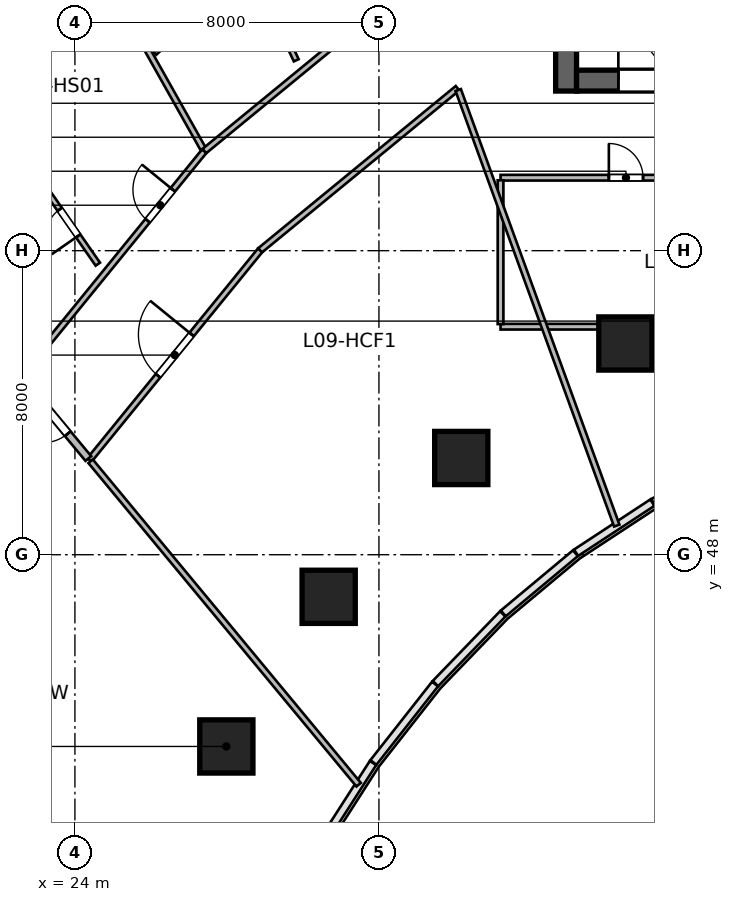
"""IFC4 building model, lengths in metres.
Left out: names, types, materials, properties, quantities, classifications, styles, units other than length and angle.
Written with IfcOpenShell. Run it as: python <this file> out.ifc"""

import sys

from ifc_helpers import new_model, si_unit, direction, frame, frame_2d, origin, origin_2d, place, context, subcontext, project, spatial, rectangle, circle, extrude, source, transform, mapped, element, fill, save


model = new_model("IFC4")
c1 = context("Model", 3, precision=1e-05, world=origin(), true_north=direction((0.0, 1.0)))
c2 = subcontext(c1, "Body", "Model", "MODEL_VIEW")
j1 = project(units=[si_unit("LENGTHUNIT", "METRE"), si_unit("PLANEANGLEUNIT", "RADIAN")], contexts=[c1])
p1 = place(None, origin())
s1 = spatial("IfcSite", under=j1, at=p1, CompositionType="ELEMENT")
p2 = place(p1, origin())
s2 = spatial("IfcBuilding", under=s1, at=p2, CompositionType="ELEMENT")
p3 = place(p2, frame((0.0, 0.0, 46.2)))
s3 = spatial("IfcBuildingStorey", under=s2, at=p3, CompositionType="ELEMENT", Elevation=46.2)
m1 = source(origin(), c2, "Body", "SweptSolid", [
    extrude(rectangle(XDim=12.0, YDim=0.55, at=frame_2d((6.0, 0.0))), origin(), (0.0, 0.0, 1.0), 3.6),
])
p4 = place(p3, frame((36.925, 60.2, 0.0), z_axis=(0.0, 0.0, 1.0), x_axis=(0.0, 1.0, 0.0)))
e1 = element("IfcWall", 1, at=p4, inside=s3, PredefinedType="SHEAR", context=c2, shape_type="MappedRepresentation", body=[
    mapped(m1, transform((0.0, 0.0, 0.0), scale=1.0)),
])
m2 = source(origin(), c2, "Body", "SweptSolid", [
    extrude(rectangle(XDim=21.6, YDim=0.55, at=frame_2d((10.8, 0.0))), origin(), (0.0, 0.0, 1.0), 3.6),
])
p5 = place(p3, frame((37.2, 60.475, 0.0), z_axis=(0.0, 0.0, 1.0), x_axis=(1.0, 0.0, 0.0)))
e2 = element("IfcWall", 2, at=p5, inside=s3, PredefinedType="SHEAR", context=c2, shape_type="MappedRepresentation", body=[
    mapped(m2, transform((0.0, 0.0, 0.0), scale=1.0)),
])
p6 = place(p5, frame((1.1, 0.0, 0.0)))
e3 = element("IfcOpeningElement", 3, at=p6, cuts=e2, PredefinedType="OPENING", context=c2, shape_type="SweptSolid", body=[
    extrude(rectangle(XDim=1.15, YDim=2.15, at=frame_2d((0.575, 1.075))), frame((0.0, 0.285, 0.0), z_axis=(0.0, -1.0, 0.0), x_axis=(1.0, 0.0, 0.0)), (0.0, 0.0, 1.0), 0.57),
])
p7 = place(p5, frame((19.5, 0.0, 0.0)))
e4 = element("IfcOpeningElement", 4, at=p7, cuts=e2, PredefinedType="OPENING", context=c2, shape_type="SweptSolid", body=[
    extrude(rectangle(XDim=0.9, YDim=2.1, at=frame_2d((0.45, 1.05))), frame((0.0, 0.285, 0.0), z_axis=(0.0, -1.0, 0.0), x_axis=(1.0, 0.0, 0.0)), (0.0, 0.0, 1.0), 0.57),
])
p8 = place(p5, frame((12.02, 0.0, 0.0)))
e5 = element("IfcOpeningElement", 5, at=p8, cuts=e2, PredefinedType="OPENING", context=c2, shape_type="SweptSolid", body=[
    extrude(rectangle(XDim=1.6, YDim=2.15, at=frame_2d((0.8, 1.075))), frame((0.0, 0.285, 0.0), z_axis=(0.0, -1.0, 0.0), x_axis=(1.0, 0.0, 0.0)), (0.0, 0.0, 1.0), 0.57),
])
m3 = source(origin(), c2, "Body", "SweptSolid", [
    extrude(circle(Radius=0.7, at=origin_2d()), origin(), (0.0, 0.0, 1.0), 3.6),
])
for number, where, z_axis, x_axis in (
    (6, (27.985, 42.955, 0.0), (0.0, 0.0, 1.0), (-0.691, 0.723, 0.0)),
    (7, (30.677, 46.892, 0.0), (0.0, 0.0, 1.0), (-0.571, 0.821, 0.0)),
    (8, (34.166, 50.545, 0.0), (0.0, 0.0, 1.0), (-0.436, 0.9, 0.0)),
    (9, (38.485, 53.558, 0.0), (0.0, 0.0, 1.0), (-0.289, 0.957, 0.0)),
):
    element("IfcColumn", number, at=place(p3, frame(where, z_axis=z_axis, x_axis=x_axis)), inside=s3, PredefinedType="COLUMN", context=c2, shape_type="MappedRepresentation", body=[
        mapped(m3, transform((0.0, 0.0, 0.0), scale=1.0)),
    ])
m4 = source(origin(), c2, "Body", "SweptSolid", [
    extrude(rectangle(XDim=6.6, YDim=0.15, at=frame_2d((3.3, 0.0))), origin(), (0.0, 0.0, 1.0), 2.803),
])
p9 = place(p3, frame((35.2, 54.0, 0.0), z_axis=(0.0, 0.0, 1.0), x_axis=(1.0, 0.0, 0.0)))
e10 = element("IfcWall", 10, at=p9, inside=s3, PredefinedType="PARTITIONING", context=c2, shape_type="MappedRepresentation", body=[
    mapped(m4, transform((0.0, 0.0, 0.0), scale=1.0)),
])
m5 = source(origin(), c2, "Body", "SweptSolid", [
    extrude(rectangle(XDim=6.6, YDim=0.15, at=frame_2d((3.3, 0.0))), origin(), (0.0, 0.0, 1.0), 3.36),
])
p10 = place(p3, frame((35.2, 57.92, 0.0), z_axis=(0.0, 0.0, 1.0), x_axis=(1.0, 0.0, 0.0)))
e11 = element("IfcWall", 11, at=p10, inside=s3, PredefinedType="PARTITIONING", context=c2, shape_type="MappedRepresentation", body=[
    mapped(m5, transform((0.0, 0.0, 0.0), scale=1.0)),
])
p11 = place(p10, frame((2.85, 0.0, 0.0)))
e12 = element("IfcOpeningElement", 12, at=p11, cuts=e11, PredefinedType="OPENING", context=c2, shape_type="SweptSolid", body=[
    extrude(rectangle(XDim=0.9, YDim=2.1, at=frame_2d((0.45, 1.05))), frame((0.0, 0.085, 0.0), z_axis=(0.0, -1.0, 0.0), x_axis=(1.0, 0.0, 0.0)), (0.0, 0.0, 1.0), 0.17),
])
m6 = source(origin(), c2, "Body", "SweptSolid", [
    extrude(rectangle(XDim=3.785, YDim=0.15, at=frame_2d((1.893, 0.0))), origin(), (0.0, 0.0, 1.0), 3.36),
])
p12 = place(p3, frame((35.2, 54.067, 0.0), z_axis=(0.0, 0.0, 1.0), x_axis=(0.0, 1.0, 0.0)))
e13 = element("IfcWall", 13, at=p12, inside=s3, PredefinedType="PARTITIONING", context=c2, shape_type="MappedRepresentation", body=[
    mapped(m6, transform((0.0, 0.0, 0.0), scale=1.0)),
])
m7 = source(origin(), c2, "Body", "SweptSolid", [
    extrude(rectangle(XDim=7.659, YDim=0.15, at=frame_2d((3.829, 0.0))), origin(), (0.0, 0.0, 1.0), 3.36),
])
p13 = place(p3, frame((22.57, 52.683, 0.0), z_axis=(0.0, 0.0, 1.0), x_axis=(0.631489868862, 0.775384127723, 0.0)))
e14 = element("IfcWall", 14, at=p13, inside=s3, PredefinedType="PARTITIONING", context=c2, shape_type="MappedRepresentation", body=[
    mapped(m7, transform((0.0, 0.0, 0.0), scale=1.0)),
])
p14 = place(p13, frame((5.295, 0.0, 0.0)))
e15 = element("IfcOpeningElement", 15, at=p14, cuts=e14, PredefinedType="OPENING", context=c2, shape_type="SweptSolid", body=[
    extrude(rectangle(XDim=1.05, YDim=2.15, at=frame_2d((0.525, 1.075))), frame((0.0, 0.085, 0.0), z_axis=(0.0, -1.0, 0.0), x_axis=(1.0, 0.0, 0.0)), (0.0, 0.0, 1.0), 0.17),
])
m8 = source(origin(), c2, "Body", "SweptSolid", [
    extrude(rectangle(XDim=11.573, YDim=0.15, at=frame_2d((5.786, 0.0))), origin(), (0.0, 0.0, 1.0), 3.36),
])
p15 = place(p3, frame((27.382, 58.664, 0.0), z_axis=(0.0, 0.0, 1.0), x_axis=(-0.490161073951, 0.871631872744, 0.0)))
e16 = element("IfcWall", 16, at=p15, inside=s3, PredefinedType="PARTITIONING", context=c2, shape_type="MappedRepresentation", body=[
    mapped(m8, transform((0.0, 0.0, 0.0), scale=1.0)),
])
m9 = source(origin(), c2, "Body", "SweptSolid", [
    extrude(rectangle(XDim=2.663, YDim=0.14, at=frame_2d((1.332, 0.0))), origin(), (0.0, 0.0, 1.0), 2.644),
])
p16 = place(p3, frame((24.603, 55.645, 0.0), z_axis=(0.0, 0.0, 1.0), x_axis=(-0.570905989724, 0.821015438891, 0.0)))
e17 = element("IfcWall", 17, at=p16, inside=s3, PredefinedType="PARTITIONING", context=c2, shape_type="MappedRepresentation", body=[
    mapped(m9, transform((0.0, 0.0, 0.0), scale=1.0)),
])
p17 = place(p16, frame((0.906, 0.0, 0.0)))
e18 = element("IfcOpeningElement", 18, at=p17, cuts=e17, PredefinedType="OPENING", context=c2, shape_type="SweptSolid", body=[
    extrude(rectangle(XDim=0.85, YDim=2.05, at=frame_2d((0.425, 1.025))), frame((0.0, 0.08, 0.0), z_axis=(0.0, -1.0, 0.0), x_axis=(1.0, 0.0, 0.0)), (0.0, 0.0, 1.0), 0.16),
])
m10 = source(origin(), c2, "Body", "SweptSolid", [
    extrude(rectangle(XDim=7.237, YDim=0.15, at=frame_2d((3.618, 0.0))), origin(), (0.0, 0.0, 1.0), 3.36),
])
p18 = place(p3, frame((27.406, 58.621, 0.0), z_axis=(0.0, 0.0, 1.0), x_axis=(0.772813707793, 0.634632943557, 0.0)))
e19 = element("IfcWall", 19, at=p18, inside=s3, PredefinedType="PARTITIONING", context=c2, shape_type="MappedRepresentation", body=[
    mapped(m10, transform((0.0, 0.0, 0.0), scale=1.0)),
])
p19 = place(p18, frame((4.975, 0.0, 0.0)))
e20 = element("IfcOpeningElement", 20, at=p19, cuts=e19, PredefinedType="OPENING", context=c2, shape_type="SweptSolid", body=[
    extrude(rectangle(XDim=1.05, YDim=2.15, at=frame_2d((0.525, 1.075))), frame((0.0, 0.085, 0.0), z_axis=(0.0, -1.0, 0.0), x_axis=(1.0, 0.0, 0.0)), (0.0, 0.0, 1.0), 0.17),
])
m11 = source(origin(), c2, "Body", "SweptSolid", [
    extrude(rectangle(XDim=3.456, YDim=0.14, at=frame_2d((1.728, 0.0))), origin(), (0.0, 0.0, 1.0), 3.36),
])
p20 = place(p3, frame((26.095, 61.207, 0.0), z_axis=(0.0, 0.0, 1.0), x_axis=(0.736860870293, 0.676044420013, 0.0)))
e21 = element("IfcWall", 21, at=p20, inside=s3, PredefinedType="PARTITIONING", context=c2, shape_type="MappedRepresentation", body=[
    mapped(m11, transform((0.0, 0.0, 0.0), scale=1.0)),
])
m12 = source(origin(), c2, "Body", "SweptSolid", [
    extrude(rectangle(XDim=2.796, YDim=0.14, at=frame_2d((1.398, 0.0))), origin(), (0.0, 0.0, 1.0), 3.36),
])
p21 = place(p3, frame((29.823, 61.009, 0.0), z_axis=(0.0, 0.0, 1.0), x_axis=(-0.422316594955, 0.906448395456, 0.0)))
e22 = element("IfcWall", 22, at=p21, inside=s3, PredefinedType="PARTITIONING", context=c2, shape_type="MappedRepresentation", body=[
    mapped(m12, transform((0.0, 0.0, 0.0), scale=1.0)),
])
p22 = place(p21, frame((0.973, 0.0, 0.0)))
e23 = element("IfcOpeningElement", 23, at=p22, cuts=e22, PredefinedType="OPENING", context=c2, shape_type="SweptSolid", body=[
    extrude(rectangle(XDim=0.85, YDim=2.05, at=frame_2d((0.425, 1.025))), frame((0.0, 0.08, 0.0), z_axis=(0.0, -1.0, 0.0), x_axis=(1.0, 0.0, 0.0)), (0.0, 0.0, 1.0), 0.16),
])
m13 = source(origin(), c2, "Body", "SweptSolid", [
    extrude(rectangle(XDim=7.113, YDim=0.15, at=frame_2d((3.556, 0.0))), origin(), (0.0, 0.0, 1.0), 3.36),
])
p23 = place(p3, frame((24.383, 50.495, 0.0), z_axis=(0.0, 0.0, 1.0), x_axis=(0.63149032532, 0.775383755974, 0.0)))
e24 = element("IfcWall", 24, at=p23, inside=s3, PredefinedType="PARTITIONING", context=c2, shape_type="MappedRepresentation", body=[
    mapped(m13, transform((0.0, 0.0, 0.0), scale=1.0)),
])
p24 = place(p23, frame((2.856, 0.0, 0.0)))
e25 = element("IfcOpeningElement", 25, at=p24, cuts=e24, PredefinedType="OPENING", context=c2, shape_type="SweptSolid", body=[
    extrude(rectangle(XDim=1.4, YDim=2.15, at=frame_2d((0.7, 1.075))), frame((0.0, 0.085, 0.0), z_axis=(0.0, -1.0, 0.0), x_axis=(1.0, 0.0, 0.0)), (0.0, 0.0, 1.0), 0.17),
])
m14 = source(origin(), c2, "Body", "SweptSolid", [
    extrude(rectangle(XDim=6.721, YDim=0.15, at=frame_2d((3.361, 0.0))), origin(), (0.0, 0.0, 1.0), 3.36),
])
p25 = place(p3, frame((28.874, 56.01, 0.0), z_axis=(0.0, 0.0, 1.0), x_axis=(0.772828051199, 0.63461547671, 0.0)))
e26 = element("IfcWall", 26, at=p25, inside=s3, PredefinedType="PARTITIONING", context=c2, shape_type="MappedRepresentation", body=[
    mapped(m14, transform((0.0, 0.0, 0.0), scale=1.0)),
])
m15 = source(origin(), c2, "Body", "SweptSolid", [
    extrude(rectangle(XDim=11.053, YDim=0.15, at=frame_2d((5.527, 0.0))), origin(), (0.0, 0.0, 1.0), 2.984),
])
p26 = place(p3, frame((31.466, 41.949, 0.0), z_axis=(0.0, 0.0, 1.0), x_axis=(-0.638131235571, 0.769927611005, 0.0)))
e27 = element("IfcWall", 27, at=p26, inside=s3, PredefinedType="PARTITIONING", context=c2, shape_type="MappedRepresentation", body=[
    mapped(m15, transform((0.0, 0.0, 0.0), scale=1.0)),
])
m16 = source(origin(), c2, "Body", "SweptSolid", [
    extrude(rectangle(XDim=12.196, YDim=0.15, at=frame_2d((6.098, 0.0))), origin(), (0.0, 0.0, 1.0), 3.36),
])
p27 = place(p3, frame((38.258, 48.766, 0.0), z_axis=(0.0, 0.0, 1.0), x_axis=(-0.342022711534, 0.939691686031, 0.0)))
e28 = element("IfcWall", 28, at=p27, inside=s3, PredefinedType="PARTITIONING", context=c2, shape_type="MappedRepresentation", body=[
    mapped(m16, transform((0.0, 0.0, 0.0), scale=1.0)),
])
m17 = source(origin(), c2, "Body", "SweptSolid", [
    extrude(rectangle(XDim=2.748, YDim=0.195, at=frame_2d((1.374, 0.0))), origin(), (0.0, 0.0, 1.0), 3.36),
])
p28 = place(p3, frame((24.353, 50.531, 0.0), z_axis=(0.0, 0.0, 1.0), x_axis=(-0.638111168284, 0.769944242729, 0.0)))
e29 = element("IfcWall", 29, at=p28, inside=s3, PredefinedType="PARTITIONING", context=c2, shape_type="MappedRepresentation", body=[
    mapped(m17, transform((0.0, 0.0, 0.0), scale=1.0)),
])
p29 = place(p28, frame((0.849, 0.0, 0.0)))
e30 = element("IfcOpeningElement", 30, at=p29, cuts=e29, PredefinedType="OPENING", context=c2, shape_type="SweptSolid", body=[
    extrude(rectangle(XDim=1.05, YDim=2.15, at=frame_2d((0.525, 1.075))), frame((0.0, 0.107, 0.0), z_axis=(0.0, -1.0, 0.0), x_axis=(1.0, 0.0, 0.0)), (0.0, 0.0, 1.0), 0.215),
])
m18 = source(origin(), c2, "Body", "SweptSolid", [
    extrude(rectangle(XDim=1.15, YDim=2.15, at=frame_2d((0.575, 1.075))), frame((0.0, 0.025, 0.0), z_axis=(0.0, -1.0, 0.0), x_axis=(1.0, 0.0, 0.0)), (0.0, 0.0, 1.0), 0.05),
])
p30 = place(p6, origin())
e31 = element("IfcDoor", 31, at=p30, inside=s3, OperationType="SINGLE_SWING_LEFT", PredefinedType="DOOR", context=c2, shape_type="MappedRepresentation", body=[
    mapped(m18, transform((0.0, 0.0, 0.0), scale=1.0)),
])
fill(e3, e31)
m19 = source(origin(), c2, "Body", "SweptSolid", [
    extrude(rectangle(XDim=0.9, YDim=2.1, at=frame_2d((0.45, 1.05))), frame((0.0, 0.025, 0.0), z_axis=(0.0, -1.0, 0.0), x_axis=(1.0, 0.0, 0.0)), (0.0, 0.0, 1.0), 0.05),
])
p31 = place(p11, origin())
e32 = element("IfcDoor", 32, at=p31, inside=s3, OperationType="SINGLE_SWING_LEFT", PredefinedType="DOOR", context=c2, shape_type="MappedRepresentation", body=[
    mapped(m19, transform((0.0, 0.0, 0.0), scale=1.0)),
])
fill(e12, e32)
m20 = source(origin(), c2, "Body", "SweptSolid", [
    extrude(rectangle(XDim=1.05, YDim=2.15, at=frame_2d((0.525, 1.075))), frame((0.0, 0.025, 0.0), z_axis=(0.0, -1.0, 0.0), x_axis=(1.0, 0.0, 0.0)), (0.0, 0.0, 1.0), 0.05),
])
p32 = place(p14, origin())
e33 = element("IfcDoor", 33, at=p32, inside=s3, OperationType="SINGLE_SWING_RIGHT", PredefinedType="DOOR", context=c2, shape_type="MappedRepresentation", body=[
    mapped(m20, transform((0.0, 0.0, 0.0), scale=1.0)),
])
fill(e15, e33)
m21 = source(origin(), c2, "Body", "SweptSolid", [
    extrude(rectangle(XDim=0.85, YDim=2.05, at=frame_2d((0.425, 1.025))), frame((0.0, 0.025, 0.0), z_axis=(0.0, -1.0, 0.0), x_axis=(1.0, 0.0, 0.0)), (0.0, 0.0, 1.0), 0.05),
])
p33 = place(p17, origin())
e34 = element("IfcDoor", 34, at=p33, inside=s3, OperationType="SINGLE_SWING_LEFT", PredefinedType="DOOR", context=c2, shape_type="MappedRepresentation", body=[
    mapped(m21, transform((0.0, 0.0, 0.0), scale=1.0)),
])
fill(e18, e34)
m22 = source(origin(), c2, "Body", "SweptSolid", [
    extrude(rectangle(XDim=1.4, YDim=2.15, at=frame_2d((0.7, 1.075))), frame((0.0, 0.025, 0.0), z_axis=(0.0, -1.0, 0.0), x_axis=(1.0, 0.0, 0.0)), (0.0, 0.0, 1.0), 0.05),
])
p34 = place(p24, origin())
e35 = element("IfcDoor", 35, at=p34, inside=s3, OperationType="SINGLE_SWING_RIGHT", PredefinedType="DOOR", context=c2, shape_type="MappedRepresentation", body=[
    mapped(m22, transform((0.0, 0.0, 0.0), scale=1.0)),
])
fill(e25, e35)
p35 = place(p29, origin())
e36 = element("IfcDoor", 36, at=p35, inside=s3, OperationType="SINGLE_SWING_RIGHT", PredefinedType="DOOR", context=c2, shape_type="MappedRepresentation", body=[
    mapped(m20, transform((0.0, 0.0, 0.0), scale=1.0)),
])
fill(e30, e36)
save(model, sys.argv[1])
